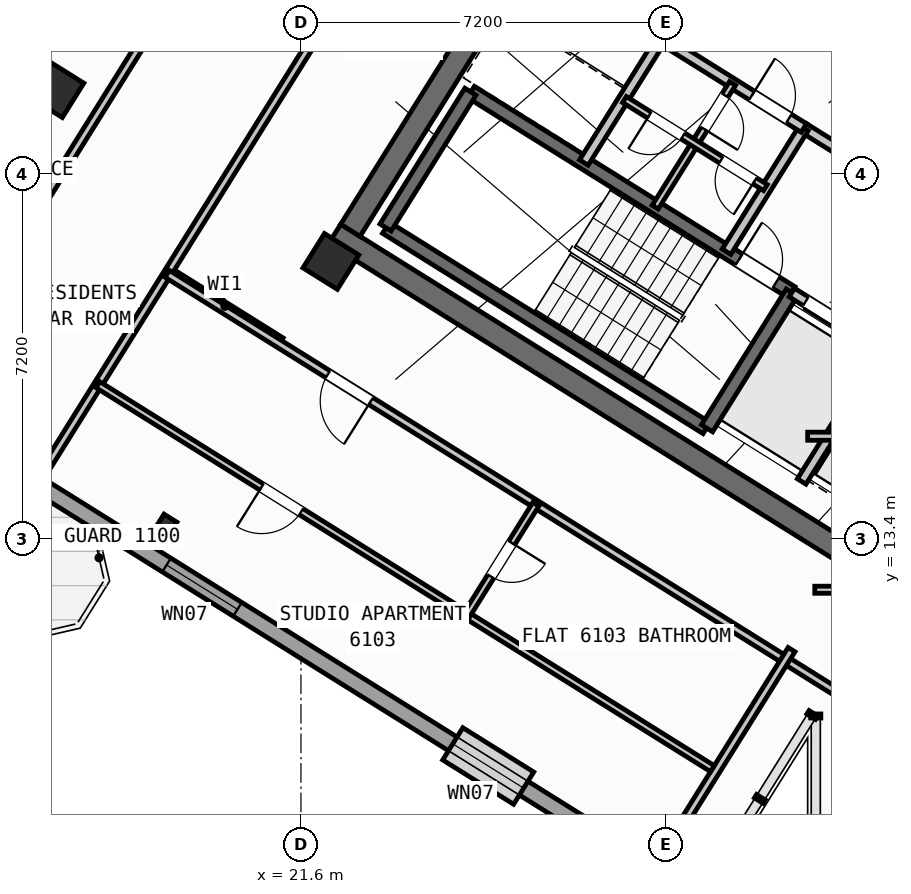
"""IFC4 building model, lengths in metres.
Left out: names, types, materials, properties, quantities, classifications, styles, units other than length and angle.
Written with IfcOpenShell. Run it as: python <this file> out.ifc"""

import sys

from ifc_helpers import new_model, si_unit, direction, frame, frame_2d, origin, origin_2d, place, context, subcontext, project, spatial, rectangle, hollow_rectangle, i_section, extrude, source, transform, mapped, element, fill, save


model = new_model("IFC4")
c1 = context("Model", 3, precision=1e-05, world=origin(), true_north=direction((0.0, 1.0)))
c2 = subcontext(c1, "Body", "Model", "MODEL_VIEW")
j1 = project(units=[si_unit("LENGTHUNIT", "METRE"), si_unit("PLANEANGLEUNIT", "RADIAN")], contexts=[c1])
p1 = place(None, origin())
s1 = spatial("IfcSite", under=j1, at=p1, CompositionType="ELEMENT")
p2 = place(p1, origin())
s2 = spatial("IfcBuilding", under=s1, at=p2, CompositionType="ELEMENT")
p3 = place(p2, frame((0.0, 0.0, 242.1)))
s3 = spatial("IfcBuildingStorey", under=s2, at=p3, CompositionType="ELEMENT", Elevation=242.1)
p4 = place(p3, frame((33.324, 12.503, 0.0), z_axis=(0.0, 0.0, 1.0), x_axis=(-0.848043529849, 0.529926571782, 0.0)))
e1 = element("IfcWall", 1, at=p4, inside=s3, PredefinedType="SHEAR", context=c2, shape_type="SweptSolid", body=[
    extrude(rectangle(XDim=13.04, YDim=0.45, at=frame_2d((6.52, 0.0))), origin(), (0.0, 0.0, 1.0), 3.32),
])
p5 = place(p3, frame((26.007, 24.976, 0.0), z_axis=(0.0, 0.0, 1.0), x_axis=(-0.529931155655, -0.848040665456, 0.0)))
e2 = element("IfcWall", 2, at=p5, inside=s3, PredefinedType="SHEAR", context=c2, shape_type="SweptSolid", body=[
    extrude(rectangle(XDim=6.475, YDim=0.45, at=frame_2d((3.238, 0.0))), origin(), (0.0, 0.0, 1.0), 3.32),
])
m1 = source(origin(), c2, "Body", "SweptSolid", [
    extrude(hollow_rectangle(XDim=0.8, YDim=0.8, WallThickness=0.032, at=origin_2d()), origin(), (0.0, 0.0, 1.0), 3.6),
])
p6 = place(p3, frame((22.191, 18.87, 0.0), z_axis=(0.0, 0.0, 1.0), x_axis=(-0.848048096156, 0.529919264233, 0.0)))
e3 = element("IfcColumn", 3, at=p6, inside=s3, PredefinedType="COLUMN", context=c2, shape_type="MappedRepresentation", body=[
    mapped(m1, transform((0.0, 0.0, 0.0), scale=1.0)),
])
m2 = source(origin(), c2, "Body", "SweptSolid", [
    extrude(i_section(OverallWidth=0.3, OverallDepth=0.45, WebThickness=0.014, FlangeThickness=0.026, at=origin_2d()), origin(), (0.0, 0.0, 1.0), 3.6),
])
p7 = place(p3, frame((18.906, 13.612, 0.0), z_axis=(0.0, 0.0, 1.0), x_axis=(-0.848048096156, 0.529919264233, 0.0)))
e4 = element("IfcColumn", 4, at=p7, inside=s3, PredefinedType="COLUMN", context=c2, shape_type="MappedRepresentation", body=[
    mapped(m2, transform((0.0, 0.0, 0.0), scale=1.0)),
])
p8 = place(p3, frame((16.764, 22.261, 0.0), z_axis=(0.0, 0.0, 1.0), x_axis=(-0.848048096156, 0.529919264233, 0.0)))
e5 = element("IfcColumn", 5, at=p8, inside=s3, PredefinedType="COLUMN", context=c2, shape_type="MappedRepresentation", body=[
    mapped(m1, transform((0.0, 0.0, 0.0), scale=1.0)),
])
p9 = place(p3, frame((29.268, 6.429, 0.0), z_axis=(0.0, 0.0, 1.0), x_axis=(-0.848049971435, 0.529916263149, 0.0)))
e6 = element("IfcWall", 6, at=p9, inside=s3, PredefinedType="STANDARD", context=c2, shape_type="SweptSolid", body=[
    extrude(rectangle(XDim=31.588, YDim=0.32, at=frame_2d((15.794, 0.0))), origin(), (0.0, 0.0, 1.0), 3.32),
])
p10 = place(p9, frame((16.235, 0.0, 0.0)))
e7 = element("IfcOpeningElement", 7, at=p10, cuts=e6, PredefinedType="OPENING", context=c2, shape_type="SweptSolid", body=[
    extrude(rectangle(XDim=1.2, YDim=2.15, at=frame_2d((0.6, 1.075))), frame((0.0, 0.17, 0.0), z_axis=(0.0, -1.0, 0.0), x_axis=(1.0, 0.0, 0.0)), (0.0, 0.0, 1.0), 0.34),
])
p11 = place(p9, frame((3.859, 0.0, 0.9)))
e8 = element("IfcOpeningElement", 8, at=p11, cuts=e6, PredefinedType="OPENING", context=c2, shape_type="SweptSolid", body=[
    extrude(rectangle(XDim=1.65, YDim=1.45, at=frame_2d((0.825, 0.725))), frame((0.0, 0.17, 0.0), z_axis=(0.0, -1.0, 0.0), x_axis=(1.0, 0.0, 0.0)), (0.0, 0.0, 1.0), 0.34),
])
p12 = place(p9, frame((10.519, 0.0, 0.9)))
e9 = element("IfcOpeningElement", 9, at=p12, cuts=e6, PredefinedType="OPENING", context=c2, shape_type="SweptSolid", body=[
    extrude(rectangle(XDim=1.65, YDim=1.45, at=frame_2d((0.825, 0.725))), frame((0.0, 0.17, 0.0), z_axis=(0.0, -1.0, 0.0), x_axis=(1.0, 0.0, 0.0)), (0.0, 0.0, 1.0), 0.34),
])
p13 = place(p9, frame((19.182, 0.0, 1.0)))
e10 = element("IfcOpeningElement", 10, at=p13, cuts=e6, PredefinedType="OPENING", context=c2, shape_type="SweptSolid", body=[
    extrude(rectangle(XDim=0.9, YDim=1.25, at=frame_2d((0.45, 0.625))), frame((0.0, 0.17, 0.0), z_axis=(0.0, -1.0, 0.0), x_axis=(1.0, 0.0, 0.0)), (0.0, 0.0, 1.0), 0.34),
])
p14 = place(p9, frame((22.524, 0.0, 1.0)))
e11 = element("IfcOpeningElement", 11, at=p14, cuts=e6, PredefinedType="OPENING", context=c2, shape_type="SweptSolid", body=[
    extrude(rectangle(XDim=0.9, YDim=1.25, at=frame_2d((0.45, 0.625))), frame((0.0, 0.17, 0.0), z_axis=(0.0, -1.0, 0.0), x_axis=(1.0, 0.0, 0.0)), (0.0, 0.0, 1.0), 0.34),
])
p15 = place(p9, frame((25.658, 0.0, 0.9)))
e12 = element("IfcOpeningElement", 12, at=p15, cuts=e6, PredefinedType="OPENING", context=c2, shape_type="SweptSolid", body=[
    extrude(rectangle(XDim=1.65, YDim=1.45, at=frame_2d((0.825, 0.725))), frame((0.0, 0.17, 0.0), z_axis=(0.0, -1.0, 0.0), x_axis=(1.0, 0.0, 0.0)), (0.0, 0.0, 1.0), 0.34),
])
p16 = place(p9, frame((29.278, 0.0, 0.9)))
e13 = element("IfcOpeningElement", 13, at=p16, cuts=e6, PredefinedType="OPENING", context=c2, shape_type="SweptSolid", body=[
    extrude(rectangle(XDim=1.35, YDim=1.45, at=frame_2d((0.675, 0.725))), frame((0.0, 0.17, 0.0), z_axis=(0.0, -1.0, 0.0), x_axis=(1.0, 0.0, 0.0)), (0.0, 0.0, 1.0), 0.34),
])
p17 = place(p3, frame((29.605, 15.581, 0.0), z_axis=(0.0, 0.0, 1.0), x_axis=(-0.848036911448, 0.529937163087, 0.0)))
e14 = element("IfcWall", 14, at=p17, inside=s3, PredefinedType="SHEAR", context=c2, shape_type="SweptSolid", body=[
    extrude(rectangle(XDim=7.46, YDim=0.26, at=frame_2d((3.73, 0.0))), origin(), (0.0, 0.0, 1.0), 3.32),
])
p18 = place(p3, frame((31.28, 18.261, 0.0), z_axis=(0.0, 0.0, 1.0), x_axis=(-0.848051618787, 0.529913626805, 0.0)))
e15 = element("IfcWall", 15, at=p18, inside=s3, PredefinedType="SHEAR", context=c2, shape_type="SweptSolid", body=[
    extrude(rectangle(XDim=7.46, YDim=0.26, at=frame_2d((3.73, 0.0))), origin(), (0.0, 0.0, 1.0), 3.32),
])
p19 = place(p18, frame((0.36, 0.0, 0.0)))
e16 = element("IfcOpeningElement", 16, at=p19, cuts=e15, PredefinedType="OPENING", context=c2, shape_type="SweptSolid", body=[
    extrude(rectangle(XDim=0.86, YDim=2.05, at=frame_2d((0.43, 1.025))), frame((0.0, 0.14, 0.0), z_axis=(0.0, -1.0, 0.0), x_axis=(1.0, 0.0, 0.0)), (0.0, 0.0, 1.0), 0.28),
])
p20 = place(p3, frame((31.288, 18.256, 0.0), z_axis=(0.0, 0.0, 1.0), x_axis=(-0.529943379326, -0.848033026897, 0.0)))
e17 = element("IfcWall", 17, at=p20, inside=s3, PredefinedType="SHEAR", context=c2, shape_type="SweptSolid", body=[
    extrude(rectangle(XDim=3.16, YDim=0.26, at=frame_2d((1.58, 0.0))), origin(), (0.0, 0.0, 1.0), 3.32),
])
p21 = place(p3, frame((24.945, 22.22, 0.0), z_axis=(0.0, 0.0, 1.0), x_axis=(-0.529908658664, -0.84805472316, 0.0)))
e18 = element("IfcWall", 18, at=p21, inside=s3, PredefinedType="SHEAR", context=c2, shape_type="SweptSolid", body=[
    extrude(rectangle(XDim=3.16, YDim=0.26, at=frame_2d((1.58, 0.0))), origin(), (0.0, 0.0, 1.0), 3.32),
])
p22 = place(p3, frame((38.046, 21.108, 0.0), z_axis=(0.0, 0.0, 1.0), x_axis=(-0.848054434086, 0.529909121291, 0.0)))
e19 = element("IfcWall", 19, at=p22, inside=s3, PredefinedType="SHEAR", context=c2, shape_type="SweptSolid", body=[
    extrude(rectangle(XDim=7.33, YDim=0.26, at=frame_2d((3.665, 0.0))), origin(), (0.0, 0.0, 1.0), 3.32),
])
p23 = place(p22, frame((0.22, 0.0, 0.0)))
e20 = element("IfcOpeningElement", 20, at=p23, cuts=e19, PredefinedType="OPENING", context=c2, shape_type="SweptSolid", body=[
    extrude(rectangle(XDim=1.1, YDim=2.1, at=frame_2d((0.55, 1.05))), frame((0.0, 0.14, 0.0), z_axis=(0.0, -1.0, 0.0), x_axis=(1.0, 0.0, 0.0)), (0.0, 0.0, 1.0), 0.28),
])
p24 = place(p3, frame((34.933, 15.978, 0.0), z_axis=(0.0, 0.0, 1.0), x_axis=(-0.848055739377, 0.529907032327, 0.0)))
e21 = element("IfcWall", 21, at=p24, inside=s3, PredefinedType="STANDARD", context=c2, shape_type="SweptSolid", body=[
    extrude(rectangle(XDim=4.298, YDim=0.2, at=frame_2d((2.149, 0.0))), origin(), (0.0, 0.0, 1.0), 3.31),
])
p25 = place(p24, frame((0.448, 0.0, 0.0)))
e22 = element("IfcOpeningElement", 22, at=p25, cuts=e21, PredefinedType="OPENING", context=c2, shape_type="SweptSolid", body=[
    extrude(rectangle(XDim=1.3, YDim=2.2, at=frame_2d((0.65, 1.1))), frame((0.0, 0.11, 0.0), z_axis=(0.0, -1.0, 0.0), x_axis=(1.0, 0.0, 0.0)), (0.0, 0.0, 1.0), 0.22),
])
p26 = place(p24, frame((2.523, 0.0, 0.0)))
e23 = element("IfcOpeningElement", 23, at=p26, cuts=e21, PredefinedType="OPENING", context=c2, shape_type="SweptSolid", body=[
    extrude(rectangle(XDim=1.45, YDim=2.25, at=frame_2d((0.725, 1.125))), frame((0.0, 0.11, 0.0), z_axis=(0.0, -1.0, 0.0), x_axis=(1.0, 0.0, 0.0)), (0.0, 0.0, 1.0), 0.22),
])
p27 = place(p3, frame((36.459, 18.421, 0.0), z_axis=(0.0, 0.0, 1.0), x_axis=(-0.848059591691, 0.529900867089, 0.0)))
e24 = element("IfcWall", 24, at=p27, inside=s3, PredefinedType="STANDARD", context=c2, shape_type="SweptSolid", body=[
    extrude(rectangle(XDim=5.818, YDim=0.2, at=frame_2d((2.909, 0.0))), origin(), (0.0, 0.0, 1.0), 3.31),
])
p28 = place(p27, frame((2.598, 0.0, 0.0)))
e25 = element("IfcOpeningElement", 25, at=p28, cuts=e24, PredefinedType="OPENING", context=c2, shape_type="SweptSolid", body=[
    extrude(rectangle(XDim=1.15, YDim=2.1, at=frame_2d((0.575, 1.05))), frame((0.0, 0.11, 0.0), z_axis=(0.0, -1.0, 0.0), x_axis=(1.0, 0.0, 0.0)), (0.0, 0.0, 1.0), 0.22),
])
p29 = place(p3, frame((33.029, 17.003, 0.0), z_axis=(0.0, 0.0, 1.0), x_axis=(-0.529916267533, -0.848049968695, 0.0)))
e26 = element("IfcWall", 26, at=p29, inside=s3, PredefinedType="STANDARD", context=c2, shape_type="SweptSolid", body=[
    extrude(rectangle(XDim=2.92, YDim=0.2, at=frame_2d((1.46, 0.0))), origin(), (0.0, 0.0, 1.0), 3.31),
])
for number, where, z_axis, x_axis in (
    (27, (31.525, 21.504, 0.0), (0.0, 0.0, 1.0), (-0.53, -0.848, 0.0)),
    (28, (28.71, 23.263, 0.0), (0.0, 0.0, 1.0), (-0.53, -0.848, 0.0)),
):
    element("IfcWall", number, at=place(p3, frame(where, z_axis=z_axis, x_axis=x_axis)), inside=s3, PredefinedType="STANDARD", context=c2, shape_type="SweptSolid", body=[
        extrude(rectangle(XDim=2.88, YDim=0.2, at=frame_2d((1.44, 0.0))), origin(), (0.0, 0.0, 1.0), 3.31),
    ])
p30 = place(p3, frame((31.525, 21.504, 0.0), z_axis=(0.0, 0.0, 1.0), x_axis=(-0.848042066329, 0.529928913853, 0.0)))
e29 = element("IfcWall", 29, at=p30, inside=s3, PredefinedType="STANDARD", context=c2, shape_type="SweptSolid", body=[
    extrude(rectangle(XDim=6.268, YDim=0.2, at=frame_2d((3.134, 0.0))), origin(), (0.0, 0.0, 1.0), 3.31),
])
p31 = place(p30, frame((4.4, 0.0, 0.0)))
e30 = element("IfcOpeningElement", 30, at=p31, cuts=e29, PredefinedType="OPENING", context=c2, shape_type="SweptSolid", body=[
    extrude(rectangle(XDim=0.86, YDim=2.05, at=frame_2d((0.43, 1.025))), frame((0.0, 0.11, 0.0), z_axis=(0.0, -1.0, 0.0), x_axis=(1.0, 0.0, 0.0)), (0.0, 0.0, 1.0), 0.22),
])
p32 = place(p30, frame((0.35, 0.0, 0.0)))
e31 = element("IfcOpeningElement", 31, at=p32, cuts=e29, PredefinedType="OPENING", context=c2, shape_type="SweptSolid", body=[
    extrude(rectangle(XDim=0.86, YDim=2.05, at=frame_2d((0.43, 1.025))), frame((0.0, 0.11, 0.0), z_axis=(0.0, -1.0, 0.0), x_axis=(1.0, 0.0, 0.0)), (0.0, 0.0, 1.0), 0.22),
])
p33 = place(p3, frame((30.117, 22.384, 0.0), z_axis=(0.0, 0.0, 1.0), x_axis=(-0.529951914384, -0.848027693204, 0.0)))
e32 = element("IfcWall", 32, at=p33, inside=s3, PredefinedType="PLUMBINGWALL", context=c2, shape_type="SweptSolid", body=[
    extrude(rectangle(XDim=1.4, YDim=0.14, at=frame_2d((0.7, 0.0))), origin(), (0.0, 0.0, 1.0), 3.31),
])
p34 = place(p33, frame((0.28, 0.0, 0.0)))
e33 = element("IfcOpeningElement", 33, at=p34, cuts=e32, PredefinedType="OPENING", context=c2, shape_type="SweptSolid", body=[
    extrude(rectangle(XDim=0.78, YDim=2.05, at=frame_2d((0.39, 1.025))), frame((0.0, 0.08, 0.0), z_axis=(0.0, -1.0, 0.0), x_axis=(1.0, 0.0, 0.0)), (0.0, 0.0, 1.0), 0.16),
])
p35 = place(p3, frame((29.375, 21.196, 0.0), z_axis=(0.0, 0.0, 1.0), x_axis=(-0.529865479138, -0.848081702443, 0.0)))
e34 = element("IfcWall", 34, at=p35, inside=s3, PredefinedType="PLUMBINGWALL", context=c2, shape_type="SweptSolid", body=[
    extrude(rectangle(XDim=1.48, YDim=0.14, at=frame_2d((0.74, 0.0))), origin(), (0.0, 0.0, 1.0), 3.31),
])
p36 = place(p3, frame((30.766, 20.327, 0.0), z_axis=(0.0, 0.0, 1.0), x_axis=(-0.848052663127, 0.529911955482, 0.0)))
e35 = element("IfcWall", 35, at=p36, inside=s3, PredefinedType="PLUMBINGWALL", context=c2, shape_type="SweptSolid", body=[
    extrude(rectangle(XDim=3.28, YDim=0.14, at=frame_2d((1.64, 0.0))), origin(), (0.0, 0.0, 1.0), 3.31),
])
p37 = place(p36, frame((0.25, 0.0, 0.0)))
e36 = element("IfcOpeningElement", 36, at=p37, cuts=e35, PredefinedType="OPENING", context=c2, shape_type="SweptSolid", body=[
    extrude(rectangle(XDim=0.78, YDim=2.05, at=frame_2d((0.39, 1.025))), frame((0.0, 0.08, 0.0), z_axis=(0.0, -1.0, 0.0), x_axis=(1.0, 0.0, 0.0)), (0.0, 0.0, 1.0), 0.16),
])
p38 = place(p36, frame((1.92, 0.0, 0.0)))
e37 = element("IfcOpeningElement", 37, at=p38, cuts=e35, PredefinedType="OPENING", context=c2, shape_type="SweptSolid", body=[
    extrude(rectangle(XDim=0.78, YDim=2.05, at=frame_2d((0.39, 1.025))), frame((0.0, 0.08, 0.0), z_axis=(0.0, -1.0, 0.0), x_axis=(1.0, 0.0, 0.0)), (0.0, 0.0, 1.0), 0.16),
])
p39 = place(p3, frame((21.206, 17.292, 0.0), z_axis=(0.0, 0.0, 1.0), x_axis=(-0.848050851465, 0.529914854792, 0.0)))
e38 = element("IfcWall", 38, at=p39, inside=s3, PredefinedType="PARTITIONING", context=c2, shape_type="SweptSolid", body=[
    extrude(rectangle(XDim=2.61, YDim=0.16, at=frame_2d((1.305, 0.0))), origin(), (0.0, 0.0, 1.0), 3.31),
])
p40 = place(p3, frame((21.938, 23.391, 0.0), z_axis=(0.0, 0.0, 1.0), x_axis=(-0.529924725692, -0.848044683434, 0.0)))
e39 = element("IfcWall", 39, at=p40, inside=s3, PredefinedType="PARTITIONING", context=c2, shape_type="SweptSolid", body=[
    extrude(rectangle(XDim=10.35, YDim=0.16, at=frame_2d((5.175, 0.0))), origin(), (0.0, 0.0, 1.0), 3.31),
])
p41 = place(p3, frame((19.529, 24.896, 0.0), z_axis=(0.0, 0.0, 1.0), x_axis=(-0.529914125013, -0.848051307476, 0.0)))
e40 = element("IfcWall", 40, at=p41, inside=s3, PredefinedType="PARTITIONING", context=c2, shape_type="SweptSolid", body=[
    extrude(rectangle(XDim=10.35, YDim=0.16, at=frame_2d((5.175, 0.0))), origin(), (0.0, 0.0, 1.0), 3.31),
])
p42 = place(p3, frame((16.837, 26.579, 0.0), z_axis=(0.0, 0.0, 1.0), x_axis=(-0.529941690036, -0.848034082547, 0.0)))
e41 = element("IfcWall", 41, at=p42, inside=s3, PredefinedType="PARTITIONING", context=c2, shape_type="SweptSolid", body=[
    extrude(rectangle(XDim=10.35, YDim=0.16, at=frame_2d((5.175, 0.0))), origin(), (0.0, 0.0, 1.0), 2.935),
])
p43 = place(p3, frame((32.164, 10.374, 0.0), z_axis=(0.0, 0.0, 1.0), x_axis=(-0.848044107957, 0.529925646633, 0.0)))
e42 = element("IfcWall", 42, at=p43, inside=s3, PredefinedType="PARTITIONING", context=c2, shape_type="SweptSolid", body=[
    extrude(rectangle(XDim=15.57, YDim=0.16, at=frame_2d((7.785, 0.0))), origin(), (0.0, 0.0, 1.0), 3.31),
])
p44 = place(p43, frame((10.83, 0.0, 0.0)))
e43 = element("IfcOpeningElement", 43, at=p44, cuts=e42, PredefinedType="OPENING", context=c2, shape_type="SweptSolid", body=[
    extrude(rectangle(XDim=1.0, YDim=2.1, at=frame_2d((0.5, 1.05))), frame((0.0, 0.09, 0.0), z_axis=(0.0, -1.0, 0.0), x_axis=(1.0, 0.0, 0.0)), (0.0, 0.0, 1.0), 0.18),
])
p45 = place(p3, frame((31.282, 11.208, 0.0), z_axis=(0.0, 0.0, 1.0), x_axis=(-0.529938869374, -0.84803584519, 0.0)))
e44 = element("IfcWall", 44, at=p45, inside=s3, PredefinedType="PARTITIONING", context=c2, shape_type="SweptSolid", body=[
    extrude(rectangle(XDim=5.48, YDim=0.16, at=frame_2d((2.74, 0.0))), origin(), (0.0, 0.0, 1.0), 3.31),
])
p46 = place(p3, frame((29.72, 8.859, 0.0), z_axis=(0.0, 0.0, 1.0), x_axis=(-0.848049134363, 0.529917602752, 0.0)))
e45 = element("IfcWall", 45, at=p46, inside=s3, PredefinedType="PLUMBINGWALL", context=c2, shape_type="SweptSolid", body=[
    extrude(rectangle(XDim=14.3, YDim=0.14, at=frame_2d((7.15, 0.0))), origin(), (0.0, 0.0, 1.0), 3.31),
])
p47 = place(p46, frame((9.57, 0.0, 0.0)))
e46 = element("IfcOpeningElement", 46, at=p47, cuts=e45, PredefinedType="OPENING", context=c2, shape_type="SweptSolid", body=[
    extrude(rectangle(XDim=0.92, YDim=2.08, at=frame_2d((0.46, 1.04))), frame((0.0, 0.08, 0.0), z_axis=(0.0, -1.0, 0.0), x_axis=(1.0, 0.0, 0.0)), (0.0, 0.0, 1.0), 0.16),
])
p48 = place(p3, frame((26.237, 14.078, 0.0), z_axis=(0.0, 0.0, 1.0), x_axis=(-0.52995640672, -0.848024885824, 0.0)))
e47 = element("IfcWall", 47, at=p48, inside=s3, PredefinedType="PLUMBINGWALL", context=c2, shape_type="SweptSolid", body=[
    extrude(rectangle(XDim=2.58, YDim=0.14, at=frame_2d((1.29, 0.0))), origin(), (0.0, 0.0, 1.0), 3.31),
])
p49 = place(p48, frame((0.9, 0.0, 0.0)))
e48 = element("IfcOpeningElement", 48, at=p49, cuts=e47, PredefinedType="OPENING", context=c2, shape_type="SweptSolid", body=[
    extrude(rectangle(XDim=0.78, YDim=2.05, at=frame_2d((0.39, 1.025))), frame((0.0, 0.08, 0.0), z_axis=(0.0, -1.0, 0.0), x_axis=(1.0, 0.0, 0.0)), (0.0, 0.0, 1.0), 0.16),
])
p50 = place(p3, frame((31.6, 15.42, 0.0), z_axis=(0.0, 0.0, 1.0), x_axis=(1.0, 0.0, 0.0)))
e49 = element("IfcWall", 49, at=p50, inside=s3, PredefinedType="PARTITIONING", context=c2, shape_type="SweptSolid", body=[
    extrude(rectangle(XDim=2.984, YDim=0.16, at=frame_2d((1.492, 0.0))), origin(), (0.0, 0.0, 1.0), 3.31),
])
p51 = place(p3, frame((31.74, 12.39, 0.0), z_axis=(0.0, 0.0, 1.0), x_axis=(1.0, 0.0, 0.0)))
e50 = element("IfcWall", 50, at=p51, inside=s3, PredefinedType="PLUMBINGWALL", context=c2, shape_type="SweptSolid", body=[
    extrude(rectangle(XDim=1.01, YDim=0.14, at=frame_2d((0.505, 0.0))), origin(), (0.0, 0.0, 1.0), 3.31),
])
m3 = source(origin(), c2, "Body", "SweptSolid", [
    extrude(rectangle(XDim=1.65, YDim=1.45, at=frame_2d((0.825, 0.725))), frame((0.0, 0.03, 0.0), z_axis=(0.0, -1.0, 0.0), x_axis=(1.0, 0.0, 0.0)), (0.0, 0.0, 1.0), 0.06),
])
p52 = place(p11, origin())
e51 = element("IfcWindow", 51, at=p52, inside=s3, PartitioningType="SINGLE_PANEL", PredefinedType="WINDOW", context=c2, shape_type="MappedRepresentation", body=[
    mapped(m3, transform((0.0, 0.0, 0.0), scale=1.0)),
])
fill(e8, e51)
p53 = place(p12, origin())
e52 = element("IfcWindow", 52, at=p53, inside=s3, PartitioningType="SINGLE_PANEL", PredefinedType="WINDOW", context=c2, shape_type="MappedRepresentation", body=[
    mapped(m3, transform((0.0, 0.0, 0.0), scale=1.0)),
])
fill(e9, e52)
m4 = source(origin(), c2, "Body", "SweptSolid", [
    extrude(rectangle(XDim=0.86, YDim=2.05, at=frame_2d((0.43, 1.025))), frame((0.0, 0.025, 0.0), z_axis=(0.0, -1.0, 0.0), x_axis=(1.0, 0.0, 0.0)), (0.0, 0.0, 1.0), 0.05),
])
p54 = place(p19, frame((0.86, 0.0, 0.0), z_axis=(0.0, 0.0, 1.0), x_axis=(-1.0, 0.0, 0.0)))
e53 = element("IfcDoor", 53, at=p54, inside=s3, OperationType="SINGLE_SWING_LEFT", PredefinedType="DOOR", context=c2, shape_type="MappedRepresentation", body=[
    mapped(m4, transform((0.0, 0.0, 0.0), scale=1.0)),
])
fill(e16, e53)
m5 = source(origin(), c2, "Body", "SweptSolid", [
    extrude(rectangle(XDim=1.45, YDim=2.25, at=frame_2d((0.725, 1.125))), frame((0.0, 0.025, 0.0), z_axis=(0.0, -1.0, 0.0), x_axis=(1.0, 0.0, 0.0)), (0.0, 0.0, 1.0), 0.05),
])
p55 = place(p26, origin())
e54 = element("IfcDoor", 54, at=p55, inside=s3, OperationType="DOUBLE_DOOR_SLIDING", PredefinedType="DOOR", context=c2, shape_type="MappedRepresentation", body=[
    mapped(m5, transform((0.0, 0.0, 0.0), scale=1.0)),
])
fill(e23, e54)
p56 = place(p32, frame((0.86, 0.0, 0.0), z_axis=(0.0, 0.0, 1.0), x_axis=(-1.0, 0.0, 0.0)))
e55 = element("IfcDoor", 55, at=p56, inside=s3, OperationType="SINGLE_SWING_LEFT", PredefinedType="DOOR", context=c2, shape_type="MappedRepresentation", body=[
    mapped(m4, transform((0.0, 0.0, 0.0), scale=1.0)),
])
fill(e31, e55)
m6 = source(origin(), c2, "Body", "SweptSolid", [
    extrude(rectangle(XDim=0.78, YDim=2.05, at=frame_2d((0.39, 1.025))), frame((0.0, 0.025, 0.0), z_axis=(0.0, -1.0, 0.0), x_axis=(1.0, 0.0, 0.0)), (0.0, 0.0, 1.0), 0.05),
])
p57 = place(p34, origin())
e56 = element("IfcDoor", 56, at=p57, inside=s3, OperationType="SINGLE_SWING_RIGHT", PredefinedType="DOOR", context=c2, shape_type="MappedRepresentation", body=[
    mapped(m6, transform((0.0, 0.0, 0.0), scale=1.0)),
])
fill(e33, e56)
p58 = place(p37, origin())
e57 = element("IfcDoor", 57, at=p58, inside=s3, OperationType="SINGLE_SWING_LEFT", PredefinedType="DOOR", context=c2, shape_type="MappedRepresentation", body=[
    mapped(m6, transform((0.0, 0.0, 0.0), scale=1.0)),
])
fill(e36, e57)
p59 = place(p38, origin())
e58 = element("IfcDoor", 58, at=p59, inside=s3, OperationType="SINGLE_SWING_RIGHT", PredefinedType="DOOR", context=c2, shape_type="MappedRepresentation", body=[
    mapped(m6, transform((0.0, 0.0, 0.0), scale=1.0)),
])
fill(e37, e58)
m7 = source(origin(), c2, "Body", "SweptSolid", [
    extrude(rectangle(XDim=1.0, YDim=2.1, at=frame_2d((0.5, 1.05))), frame((0.0, 0.025, 0.0), z_axis=(0.0, -1.0, 0.0), x_axis=(1.0, 0.0, 0.0)), (0.0, 0.0, 1.0), 0.05),
])
p60 = place(p44, origin())
e59 = element("IfcDoor", 59, at=p60, inside=s3, OperationType="SINGLE_SWING_LEFT", PredefinedType="DOOR", context=c2, shape_type="MappedRepresentation", body=[
    mapped(m7, transform((0.0, 0.0, 0.0), scale=1.0)),
])
fill(e43, e59)
m8 = source(origin(), c2, "Body", "SweptSolid", [
    extrude(rectangle(XDim=0.92, YDim=2.08, at=frame_2d((0.46, 1.04))), frame((0.0, 0.025, 0.0), z_axis=(0.0, -1.0, 0.0), x_axis=(1.0, 0.0, 0.0)), (0.0, 0.0, 1.0), 0.05),
])
p61 = place(p47, origin())
e60 = element("IfcDoor", 60, at=p61, inside=s3, OperationType="SINGLE_SWING_RIGHT", PredefinedType="DOOR", context=c2, shape_type="MappedRepresentation", body=[
    mapped(m8, transform((0.0, 0.0, 0.0), scale=1.0)),
])
fill(e46, e60)
p62 = place(p49, origin())
e61 = element("IfcDoor", 61, at=p62, inside=s3, OperationType="SINGLE_SWING_LEFT", PredefinedType="DOOR", context=c2, shape_type="MappedRepresentation", body=[
    mapped(m6, transform((0.0, 0.0, 0.0), scale=1.0)),
])
fill(e48, e61)
save(model, sys.argv[1])
